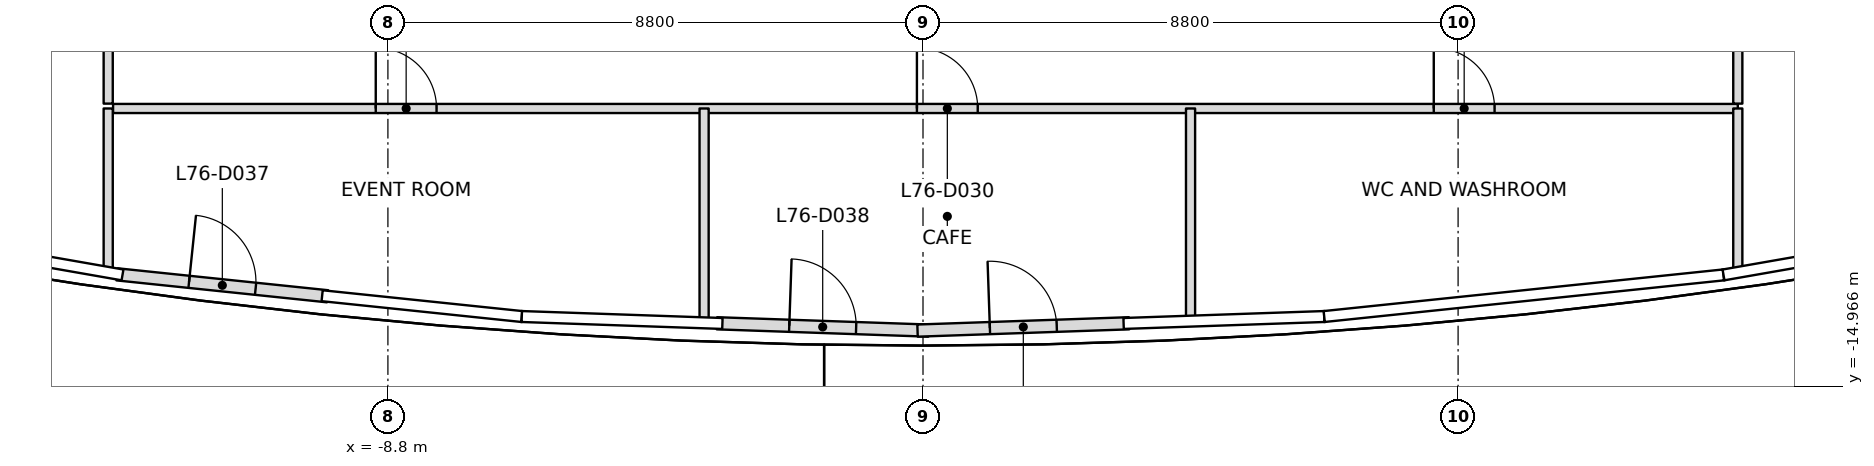
"""IFC4 building model, lengths in metres.
Left out: names, types, materials, properties, quantities, classifications, styles, units other than length and angle.
Written with IfcOpenShell. Run it as: python <this file> out.ifc"""

import sys

from ifc_helpers import new_model, si_unit, direction, frame, frame_2d, origin, place, context, subcontext, project, spatial, rectangle, extrude, element, fill, save


model = new_model("IFC4")
c1 = context("Model", 3, precision=1e-05, world=origin(), true_north=direction((0.0, 1.0)))
c2 = subcontext(c1, "Body", "Model", "MODEL_VIEW")
j1 = project(units=[si_unit("LENGTHUNIT", "METRE"), si_unit("PLANEANGLEUNIT", "RADIAN")], contexts=[c1])
p1 = place(None, origin())
s1 = spatial("IfcSite", under=j1, at=p1, CompositionType="ELEMENT")
p2 = place(p1, origin())
s2 = spatial("IfcBuilding", under=s1, at=p2, CompositionType="ELEMENT")
p3 = place(p2, frame((0.0, 0.0, 339.4)))
s3 = spatial("IfcBuildingStorey", under=s2, at=p3, CompositionType="ELEMENT", Elevation=339.4)
p4 = place(p3, frame((-13.254, -13.128, 0.0), z_axis=(0.0, 0.0, 1.0), x_axis=(0.99460605578, -0.103724605592, 0.0)))
e1 = element("IfcWall", 1, at=p4, inside=s3, PredefinedType="SOLIDWALL", context=c2, shape_type="SweptSolid", body=[
    extrude(rectangle(XDim=3.481, YDim=0.2, at=frame_2d((1.741, 0.0))), origin(), (0.0, 0.0, 1.0), 4.533),
])
p5 = place(p4, frame((1.19, 0.0, 0.0)))
e2 = element("IfcOpeningElement", 2, at=p5, cuts=e1, PredefinedType="OPENING", context=c2, shape_type="SweptSolid", body=[
    extrude(rectangle(XDim=1.1, YDim=2.1, at=frame_2d((0.55, 1.05))), frame((0.0, 0.1, 0.0), z_axis=(0.0, -1.0, 0.0), x_axis=(1.0, 0.0, 0.0)), (0.0, 0.0, 1.0), 0.2),
])
p6 = place(p3, frame((-3.389, -13.933, 0.0), z_axis=(0.0, 0.0, 1.0), x_axis=(0.99939965217, -0.034645854609, 0.0)))
e3 = element("IfcWall", 3, at=p6, inside=s3, PredefinedType="SOLIDWALL", context=c2, shape_type="SweptSolid", body=[
    extrude(rectangle(XDim=3.481, YDim=0.2, at=frame_2d((1.741, 0.0))), origin(), (0.0, 0.0, 1.0), 4.533),
])
p7 = place(p6, frame((1.19, 0.0, 0.0)))
e4 = element("IfcOpeningElement", 4, at=p7, cuts=e3, PredefinedType="OPENING", context=c2, shape_type="SweptSolid", body=[
    extrude(rectangle(XDim=1.1, YDim=2.1, at=frame_2d((0.55, 1.05))), frame((0.0, 0.1, 0.0), z_axis=(0.0, -1.0, 0.0), x_axis=(1.0, 0.0, 0.0)), (0.0, 0.0, 1.0), 0.2),
])
p8 = place(p3, frame((-0.09, -14.053, 0.0), z_axis=(0.0, 0.0, 1.0), x_axis=(0.99939965217, 0.034645854609, 0.0)))
e5 = element("IfcWall", 5, at=p8, inside=s3, PredefinedType="SOLIDWALL", context=c2, shape_type="SweptSolid", body=[
    extrude(rectangle(XDim=3.481, YDim=0.2, at=frame_2d((1.741, 0.0))), origin(), (0.0, 0.0, 1.0), 4.533),
])
p9 = place(p8, frame((1.19, 0.0, 0.0)))
e6 = element("IfcOpeningElement", 6, at=p9, cuts=e5, PredefinedType="OPENING", context=c2, shape_type="SweptSolid", body=[
    extrude(rectangle(XDim=1.1, YDim=2.1, at=frame_2d((0.55, 1.05))), frame((0.0, 0.1, 0.0), z_axis=(0.0, -1.0, 0.0), x_axis=(1.0, 0.0, 0.0)), (0.0, 0.0, 1.0), 0.2),
])
p10 = place(p3, frame((-13.4, -10.4, 0.0), z_axis=(0.0, 0.0, 1.0), x_axis=(0.0, -1.0, 0.0)))
e7 = element("IfcWall", 7, at=p10, inside=s3, PredefinedType="PARTITIONING", context=c2, shape_type="SweptSolid", body=[
    extrude(rectangle(XDim=2.701, YDim=0.15, at=frame_2d((1.35, 0.0))), origin(), (0.0, 0.0, 1.0), 4.75),
])
p11 = place(p3, frame((-3.6, -10.4, 0.0), z_axis=(0.0, 0.0, 1.0), x_axis=(0.0, -1.0, 0.0)))
e8 = element("IfcWall", 8, at=p11, inside=s3, PredefinedType="PARTITIONING", context=c2, shape_type="SweptSolid", body=[
    extrude(rectangle(XDim=3.579, YDim=0.15, at=frame_2d((1.79, 0.0))), origin(), (0.0, 0.0, 1.0), 4.533),
])
p12 = place(p3, frame((4.4, -10.4, 0.0), z_axis=(0.0, 0.0, 1.0), x_axis=(0.0, -1.0, 0.0)))
e9 = element("IfcWall", 9, at=p12, inside=s3, PredefinedType="PARTITIONING", context=c2, shape_type="SweptSolid", body=[
    extrude(rectangle(XDim=3.545, YDim=0.15, at=frame_2d((1.772, 0.0))), origin(), (0.0, 0.0, 1.0), 4.533),
])
p13 = place(p3, frame((13.4, -13.101, 0.0), z_axis=(0.0, 0.0, 1.0), x_axis=(0.0, 1.0, 0.0)))
e10 = element("IfcWall", 10, at=p13, inside=s3, PredefinedType="PARTITIONING", context=c2, shape_type="SweptSolid", body=[
    extrude(rectangle(XDim=2.701, YDim=0.15, at=frame_2d((1.35, 0.0))), origin(), (0.0, 0.0, 1.0), 4.75),
])
p14 = place(p3, frame((-13.4, 4.815, 0.0), z_axis=(0.0, 0.0, 1.0), x_axis=(0.0, -1.0, 0.0)))
e11 = element("IfcWall", 11, at=p14, inside=s3, PredefinedType="PARTITIONING", context=c2, shape_type="SweptSolid", body=[
    extrude(rectangle(XDim=15.135, YDim=0.15, at=frame_2d((7.568, 0.0))), origin(), (0.0, 0.0, 1.0), 4.533),
])
p15 = place(p14, frame((7.117, 0.0, 0.0)))
e12 = element("IfcOpeningElement", 12, at=p15, cuts=e11, PredefinedType="OPENING", context=c2, shape_type="SweptSolid", body=[
    extrude(rectangle(XDim=1.0, YDim=2.1, at=frame_2d((0.5, 1.05))), frame((0.0, 0.075, 0.0), z_axis=(0.0, -1.0, 0.0), x_axis=(1.0, 0.0, 0.0)), (0.0, 0.0, 1.0), 0.15),
])
p16 = place(p3, frame((-13.32, -10.4, 0.0), z_axis=(0.0, 0.0, 1.0), x_axis=(1.0, 0.0, 0.0)))
e13 = element("IfcWall", 13, at=p16, inside=s3, PredefinedType="PARTITIONING", context=c2, shape_type="SweptSolid", body=[
    extrude(rectangle(XDim=26.72, YDim=0.15, at=frame_2d((13.36, 0.0))), origin(), (0.0, 0.0, 1.0), 4.533),
])
p17 = place(p16, frame((4.32, 0.0, 0.0)))
e14 = element("IfcOpeningElement", 14, at=p17, cuts=e13, PredefinedType="OPENING", context=c2, shape_type="SweptSolid", body=[
    extrude(rectangle(XDim=1.0, YDim=2.1, at=frame_2d((0.5, 1.05))), frame((0.0, 0.075, 0.0), z_axis=(0.0, -1.0, 0.0), x_axis=(1.0, 0.0, 0.0)), (0.0, 0.0, 1.0), 0.15),
])
p18 = place(p16, frame((13.22, 0.0, 0.0)))
e15 = element("IfcOpeningElement", 15, at=p18, cuts=e13, PredefinedType="OPENING", context=c2, shape_type="SweptSolid", body=[
    extrude(rectangle(XDim=1.0, YDim=2.1, at=frame_2d((0.5, 1.05))), frame((0.0, 0.075, 0.0), z_axis=(0.0, -1.0, 0.0), x_axis=(1.0, 0.0, 0.0)), (0.0, 0.0, 1.0), 0.15),
])
p19 = place(p16, frame((21.72, 0.0, 0.0)))
e16 = element("IfcOpeningElement", 16, at=p19, cuts=e13, PredefinedType="OPENING", context=c2, shape_type="SweptSolid", body=[
    extrude(rectangle(XDim=1.0, YDim=2.1, at=frame_2d((0.5, 1.05))), frame((0.0, 0.075, 0.0), z_axis=(0.0, -1.0, 0.0), x_axis=(1.0, 0.0, 0.0)), (0.0, 0.0, 1.0), 0.15),
])
p20 = place(p3, frame((13.4, -10.32, 0.0), z_axis=(0.0, 0.0, 1.0), x_axis=(0.0, 1.0, 0.0)))
e17 = element("IfcWall", 17, at=p20, inside=s3, PredefinedType="PARTITIONING", context=c2, shape_type="SweptSolid", body=[
    extrude(rectangle(XDim=15.135, YDim=0.15, at=frame_2d((7.568, 0.0))), origin(), (0.0, 0.0, 1.0), 4.533),
])
p21 = place(p20, frame((7.018, 0.0, 0.0)))
e18 = element("IfcOpeningElement", 18, at=p21, cuts=e17, PredefinedType="OPENING", context=c2, shape_type="SweptSolid", body=[
    extrude(rectangle(XDim=1.0, YDim=2.1, at=frame_2d((0.5, 1.05))), frame((0.0, 0.075, 0.0), z_axis=(0.0, -1.0, 0.0), x_axis=(1.0, 0.0, 0.0)), (0.0, 0.0, 1.0), 0.15),
])
p22 = place(p5, origin())
e19 = element("IfcDoor", 19, at=p22, inside=s3, OperationType="SINGLE_SWING_LEFT", PredefinedType="DOOR", context=c2, shape_type="SweptSolid", body=[
    extrude(rectangle(XDim=1.1, YDim=2.1, at=frame_2d((0.55, 1.05))), frame((0.0, 0.025, 0.0), z_axis=(0.0, -1.0, 0.0), x_axis=(1.0, 0.0, 0.0)), (0.0, 0.0, 1.0), 0.05),
])
fill(e2, e19)
p23 = place(p7, origin())
e20 = element("IfcDoor", 20, at=p23, inside=s3, OperationType="SINGLE_SWING_LEFT", PredefinedType="DOOR", context=c2, shape_type="SweptSolid", body=[
    extrude(rectangle(XDim=1.1, YDim=2.1, at=frame_2d((0.55, 1.05))), frame((0.0, 0.025, 0.0), z_axis=(0.0, -1.0, 0.0), x_axis=(1.0, 0.0, 0.0)), (0.0, 0.0, 1.0), 0.05),
])
fill(e4, e20)
p24 = place(p9, origin())
e21 = element("IfcDoor", 21, at=p24, inside=s3, OperationType="SINGLE_SWING_RIGHT", PredefinedType="DOOR", context=c2, shape_type="SweptSolid", body=[
    extrude(rectangle(XDim=1.1, YDim=2.1, at=frame_2d((0.55, 1.05))), frame((0.0, 0.025, 0.0), z_axis=(0.0, -1.0, 0.0), x_axis=(1.0, 0.0, 0.0)), (0.0, 0.0, 1.0), 0.05),
])
fill(e6, e21)
p25 = place(p17, origin())
e22 = element("IfcDoor", 22, at=p25, inside=s3, OperationType="SINGLE_SWING_RIGHT", PredefinedType="DOOR", context=c2, shape_type="SweptSolid", body=[
    extrude(rectangle(XDim=1.0, YDim=2.1, at=frame_2d((0.5, 1.05))), frame((0.0, 0.025, 0.0), z_axis=(0.0, -1.0, 0.0), x_axis=(1.0, 0.0, 0.0)), (0.0, 0.0, 1.0), 0.05),
])
fill(e14, e22)
p26 = place(p18, origin())
e23 = element("IfcDoor", 23, at=p26, inside=s3, OperationType="SINGLE_SWING_RIGHT", PredefinedType="DOOR", context=c2, shape_type="SweptSolid", body=[
    extrude(rectangle(XDim=1.0, YDim=2.1, at=frame_2d((0.5, 1.05))), frame((0.0, 0.025, 0.0), z_axis=(0.0, -1.0, 0.0), x_axis=(1.0, 0.0, 0.0)), (0.0, 0.0, 1.0), 0.05),
])
fill(e15, e23)
p27 = place(p19, origin())
e24 = element("IfcDoor", 24, at=p27, inside=s3, OperationType="SINGLE_SWING_LEFT", PredefinedType="DOOR", context=c2, shape_type="SweptSolid", body=[
    extrude(rectangle(XDim=1.0, YDim=2.1, at=frame_2d((0.5, 1.05))), frame((0.0, 0.025, 0.0), z_axis=(0.0, -1.0, 0.0), x_axis=(1.0, 0.0, 0.0)), (0.0, 0.0, 1.0), 0.05),
])
fill(e16, e24)
save(model, sys.argv[1])
